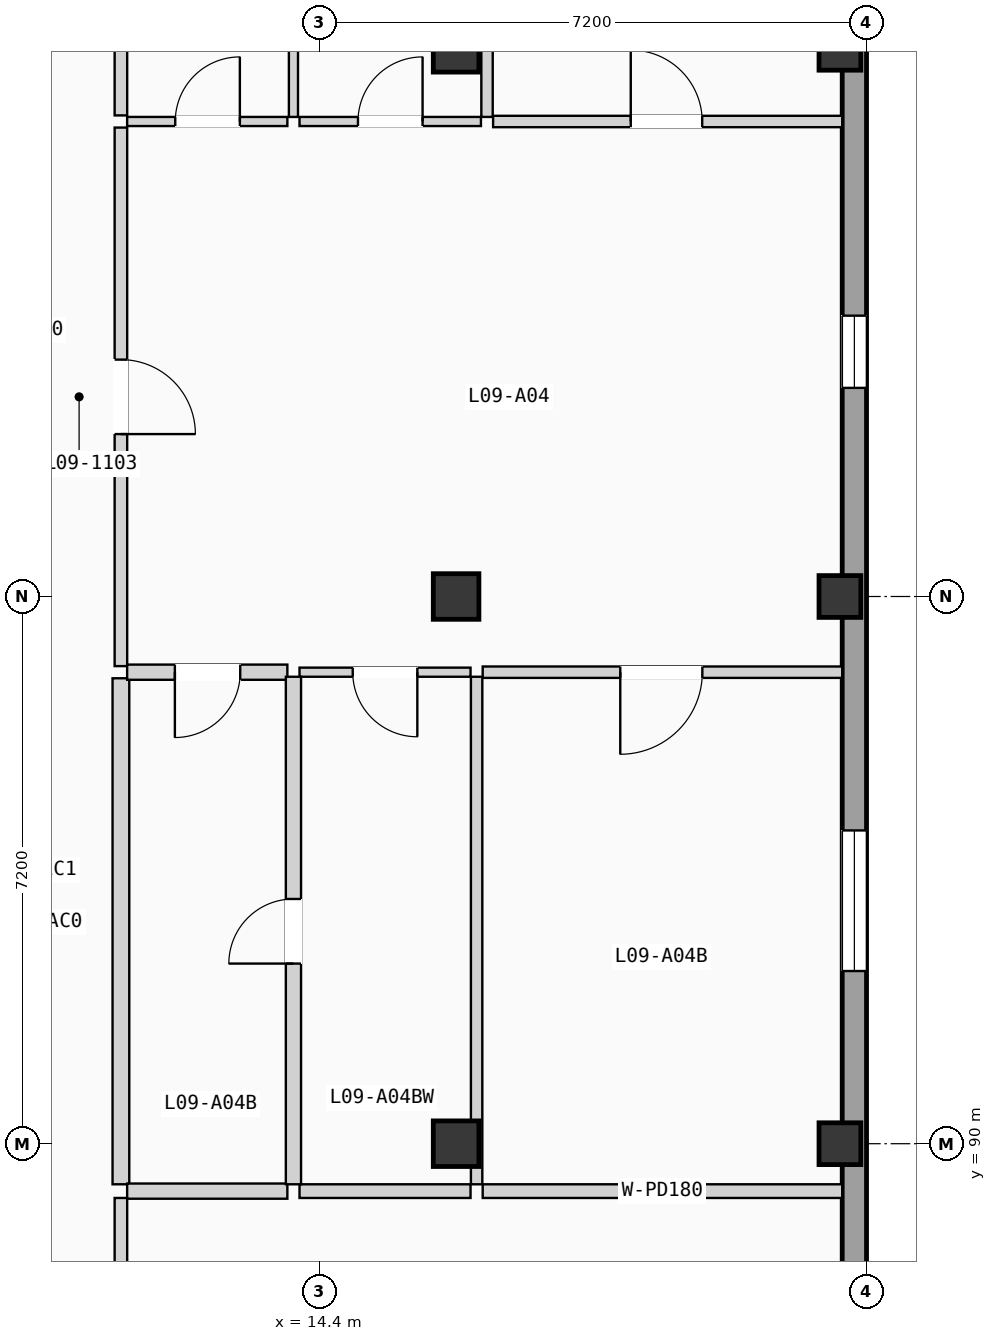
"""IFC4 building model, lengths in metres.
Left out: names, types, materials, properties, quantities, classifications, styles, units other than length and angle.
Written with IfcOpenShell. Run it as: python <this file> out.ifc"""

import sys

from ifc_helpers import new_model, si_unit, direction, frame, frame_2d, origin, origin_2d, place, context, subcontext, project, spatial, rectangle, extrude, element, fill, save


model = new_model("IFC4")
c1 = context("Model", 3, precision=1e-05, world=origin(), true_north=direction((0.0, 1.0)))
c2 = subcontext(c1, "Body", "Model", "MODEL_VIEW")
j1 = project(units=[si_unit("LENGTHUNIT", "METRE"), si_unit("PLANEANGLEUNIT", "RADIAN")], contexts=[c1])
p1 = place(None, origin())
s1 = spatial("IfcSite", under=j1, at=p1, CompositionType="ELEMENT")
p2 = place(p1, origin())
s2 = spatial("IfcBuilding", under=s1, at=p2, CompositionType="ELEMENT")
p3 = place(p2, frame((0.0, 0.0, 30.975)))
s3 = spatial("IfcBuildingStorey", under=s2, at=p3, CompositionType="ELEMENT", Elevation=30.975)
for number, where, z_axis, x_axis in (
    (1, (16.2, 90.0, 0.0), (0.0, 0.0, 1.0), (1.0, 0.0, 0.0)),
    (2, (16.2, 97.2, 0.0), (0.0, 0.0, 1.0), (1.0, 0.0, 0.0)),
    (3, (16.2, 104.4, 0.0), (0.0, 0.0, 1.0), (1.0, 0.0, 0.0)),
):
    element("IfcColumn", number, at=place(p3, frame(where, z_axis=z_axis, x_axis=x_axis)), inside=s3, PredefinedType="COLUMN", context=c2, shape_type="SweptSolid", body=[
        extrude(rectangle(XDim=0.6, YDim=0.6, at=origin_2d()), origin(), (0.0, 0.0, 1.0), 3.15),
    ])
for number, where, z_axis, x_axis in (
    (4, (21.25, 90.0, 0.0), (0.0, 0.0, 1.0), (1.0, 0.0, 0.0)),
    (5, (21.25, 97.2, 0.0), (0.0, 0.0, 1.0), (1.0, 0.0, 0.0)),
    (6, (21.25, 104.4, 0.0), (0.0, 0.0, 1.0), (1.0, 0.0, 0.0)),
):
    element("IfcColumn", number, at=place(p3, frame(where, z_axis=z_axis, x_axis=x_axis)), inside=s3, PredefinedType="COLUMN", context=c2, shape_type="SweptSolid", body=[
        extrude(rectangle(XDim=0.55, YDim=0.55, at=origin_2d()), origin(), (0.0, 0.0, 1.0), 3.15),
    ])
p4 = place(p3, frame((21.44, 68.72, 0.0), z_axis=(0.0, 0.0, 1.0), x_axis=(0.0, 1.0, 0.0)))
e7 = element("IfcWall", 7, at=p4, inside=s3, PredefinedType="SOLIDWALL", context=c2, shape_type="SweptSolid", body=[
    extrude(rectangle(XDim=49.76, YDim=0.32, at=frame_2d((24.88, 0.0))), origin(), (0.0, 0.0, 1.0), 2.9),
])
p5 = place(p4, frame((9.685, 0.0, 0.715)))
e8 = element("IfcOpeningElement", 8, at=p5, cuts=e7, PredefinedType="OPENING", context=c2, shape_type="SweptSolid", body=[
    extrude(rectangle(XDim=1.72, YDim=1.5, at=frame_2d((0.86, 0.75))), frame((0.0, 0.17, 0.0), z_axis=(0.0, -1.0, 0.0), x_axis=(1.0, 0.0, 0.0)), (0.0, 0.0, 1.0), 0.34),
])
p6 = place(p4, frame((16.598, 0.0, 0.565)))
e9 = element("IfcOpeningElement", 9, at=p6, cuts=e7, PredefinedType="OPENING", context=c2, shape_type="SweptSolid", body=[
    extrude(rectangle(XDim=1.72, YDim=1.65, at=frame_2d((0.86, 0.825))), frame((0.0, 0.17, 0.0), z_axis=(0.0, -1.0, 0.0), x_axis=(1.0, 0.0, 0.0)), (0.0, 0.0, 1.0), 0.34),
])
p7 = place(p4, frame((31.225, 0.0, 0.85)))
e10 = element("IfcOpeningElement", 10, at=p7, cuts=e7, PredefinedType="OPENING", context=c2, shape_type="SweptSolid", body=[
    extrude(rectangle(XDim=0.95, YDim=1.2, at=frame_2d((0.475, 0.6))), frame((0.0, 0.17, 0.0), z_axis=(0.0, -1.0, 0.0), x_axis=(1.0, 0.0, 0.0)), (0.0, 0.0, 1.0), 0.34),
])
p8 = place(p4, frame((23.552, 0.0, 0.9)))
e11 = element("IfcOpeningElement", 11, at=p8, cuts=e7, PredefinedType="OPENING", context=c2, shape_type="SweptSolid", body=[
    extrude(rectangle(XDim=1.85, YDim=1.2, at=frame_2d((0.925, 0.6))), frame((0.0, 0.17, 0.0), z_axis=(0.0, -1.0, 0.0), x_axis=(1.0, 0.0, 0.0)), (0.0, 0.0, 1.0), 0.34),
])
p9 = place(p4, frame((38.29, 0.0, 0.865)))
e12 = element("IfcOpeningElement", 12, at=p9, cuts=e7, PredefinedType="OPENING", context=c2, shape_type="SweptSolid", body=[
    extrude(rectangle(XDim=1.85, YDim=1.35, at=frame_2d((0.925, 0.675))), frame((0.0, 0.17, 0.0), z_axis=(0.0, -1.0, 0.0), x_axis=(1.0, 0.0, 0.0)), (0.0, 0.0, 1.0), 0.34),
])
p10 = place(p3, frame((11.79, 82.733, 0.0), z_axis=(0.0, 0.0, 1.0), x_axis=(0.0, 1.0, 0.0)))
e13 = element("IfcWall", 13, at=p10, inside=s3, PredefinedType="PARTITIONING", context=c2, shape_type="SweptSolid", body=[
    extrude(rectangle(XDim=6.553, YDim=0.165, at=frame_2d((3.276, 0.0))), origin(), (0.0, 0.0, 1.0), 2.87),
])
p11 = place(p10, frame((2.786, 0.0, 0.0)))
e14 = element("IfcOpeningElement", 14, at=p11, cuts=e13, PredefinedType="OPENING", context=c2, shape_type="SweptSolid", body=[
    extrude(rectangle(XDim=0.98, YDim=2.08, at=frame_2d((0.49, 1.04))), frame((0.0, 0.093, 0.0), z_axis=(0.0, -1.0, 0.0), x_axis=(1.0, 0.0, 0.0)), (0.0, 0.0, 1.0), 0.185),
])
p12 = place(p3, frame((11.79, 96.284, 0.0), z_axis=(0.0, 0.0, 1.0), x_axis=(0.0, 1.0, 0.0)))
e15 = element("IfcWall", 15, at=p12, inside=s3, PredefinedType="PARTITIONING", context=c2, shape_type="SweptSolid", body=[
    extrude(rectangle(XDim=7.086, YDim=0.165, at=frame_2d((3.543, 0.0))), origin(), (0.0, 0.0, 1.0), 2.87),
])
p13 = place(p12, frame((3.053, 0.0, 0.0)))
e16 = element("IfcOpeningElement", 16, at=p13, cuts=e15, PredefinedType="OPENING", context=c2, shape_type="SweptSolid", body=[
    extrude(rectangle(XDim=0.98, YDim=2.08, at=frame_2d((0.49, 1.04))), frame((0.0, 0.093, 0.0), z_axis=(0.0, -1.0, 0.0), x_axis=(1.0, 0.0, 0.0)), (0.0, 0.0, 1.0), 0.185),
])
p14 = place(p3, frame((11.79, 89.466, 0.0), z_axis=(0.0, 0.0, 1.0), x_axis=(0.0, 1.0, 0.0)))
e17 = element("IfcWall", 17, at=p14, inside=s3, PredefinedType="PLUMBINGWALL", context=c2, shape_type="SweptSolid", body=[
    extrude(rectangle(XDim=6.658, YDim=0.22, at=frame_2d((3.329, 0.0))), origin(), (0.0, 0.0, 1.0), 2.87),
])
p15 = place(p3, frame((11.79, 103.53, 0.0), z_axis=(0.0, 0.0, 1.0), x_axis=(0.0, 1.0, 0.0)))
e18 = element("IfcWall", 18, at=p15, inside=s3, PredefinedType="PARTITIONING", context=c2, shape_type="SweptSolid", body=[
    extrude(rectangle(XDim=7.67, YDim=0.165, at=frame_2d((3.835, 0.0))), origin(), (0.0, 0.0, 1.0), 2.87),
])
p16 = place(p3, frame((11.872, 89.376, 0.0), z_axis=(0.0, 0.0, 1.0), x_axis=(1.0, 0.0, 0.0)))
e19 = element("IfcWall", 19, at=p16, inside=s3, PredefinedType="PLUMBINGWALL", context=c2, shape_type="SweptSolid", body=[
    extrude(rectangle(XDim=2.108, YDim=0.2, at=frame_2d((1.054, 0.0))), origin(), (0.0, 0.0, 1.0), 2.87),
])
p17 = place(p3, frame((16.55, 89.376, 0.0), z_axis=(0.0, 0.0, 1.0), x_axis=(1.0, 0.0, 0.0)))
e20 = element("IfcWall", 20, at=p17, inside=s3, PredefinedType="PARTITIONING", context=c2, shape_type="SweptSolid", body=[
    extrude(rectangle(XDim=4.73, YDim=0.18, at=frame_2d((2.365, 0.0))), origin(), (0.0, 0.0, 1.0), 2.87),
])
p18 = place(p3, frame((14.14, 89.376, 0.0), z_axis=(0.0, 0.0, 1.0), x_axis=(1.0, 0.0, 0.0)))
e21 = element("IfcWall", 21, at=p18, inside=s3, PredefinedType="PARTITIONING", context=c2, shape_type="SweptSolid", body=[
    extrude(rectangle(XDim=2.25, YDim=0.18, at=frame_2d((1.125, 0.0))), origin(), (0.0, 0.0, 1.0), 2.87),
])
p19 = place(p3, frame((11.872, 96.204, 0.0), z_axis=(0.0, 0.0, 1.0), x_axis=(1.0, 0.0, 0.0)))
e22 = element("IfcWall", 22, at=p19, inside=s3, PredefinedType="PLUMBINGWALL", context=c2, shape_type="SweptSolid", body=[
    extrude(rectangle(XDim=2.108, YDim=0.2, at=frame_2d((1.054, 0.0))), origin(), (0.0, 0.0, 1.0), 2.87),
])
p20 = place(p19, frame((0.628, 0.0, 0.0)))
e23 = element("IfcOpeningElement", 23, at=p20, cuts=e22, PredefinedType="OPENING", context=c2, shape_type="SweptSolid", body=[
    extrude(rectangle(XDim=0.86, YDim=2.0, at=frame_2d((0.43, 1.0))), frame((0.0, 0.11, 0.0), z_axis=(0.0, -1.0, 0.0), x_axis=(1.0, 0.0, 0.0)), (0.0, 0.0, 1.0), 0.22),
])
p21 = place(p3, frame((11.872, 103.45, 0.0), z_axis=(0.0, 0.0, 1.0), x_axis=(1.0, 0.0, 0.0)))
e24 = element("IfcWall", 24, at=p21, inside=s3, PredefinedType="PARTITIONING", context=c2, shape_type="SweptSolid", body=[
    extrude(rectangle(XDim=2.108, YDim=0.12, at=frame_2d((1.054, 0.0))), origin(), (0.0, 0.0, 1.0), 2.87),
])
p22 = place(p21, frame((0.633, 0.0, 0.0)))
e25 = element("IfcOpeningElement", 25, at=p22, cuts=e24, PredefinedType="OPENING", context=c2, shape_type="SweptSolid", body=[
    extrude(rectangle(XDim=0.85, YDim=2.01, at=frame_2d((0.425, 1.005))), frame((0.0, 0.07, 0.0), z_axis=(0.0, -1.0, 0.0), x_axis=(1.0, 0.0, 0.0)), (0.0, 0.0, 1.0), 0.14),
])
p23 = place(p3, frame((16.55, 96.204, 0.0), z_axis=(0.0, 0.0, 1.0), x_axis=(1.0, 0.0, 0.0)))
e26 = element("IfcWall", 26, at=p23, inside=s3, PredefinedType="PARTITIONING", context=c2, shape_type="SweptSolid", body=[
    extrude(rectangle(XDim=4.73, YDim=0.15, at=frame_2d((2.365, 0.0))), origin(), (0.0, 0.0, 1.0), 2.87),
])
p24 = place(p23, frame((1.81, 0.0, 0.0)))
e27 = element("IfcOpeningElement", 27, at=p24, cuts=e26, PredefinedType="OPENING", context=c2, shape_type="SweptSolid", body=[
    extrude(rectangle(XDim=1.08, YDim=2.1, at=frame_2d((0.54, 1.05))), frame((0.0, 0.085, 0.0), z_axis=(0.0, -1.0, 0.0), x_axis=(1.0, 0.0, 0.0)), (0.0, 0.0, 1.0), 0.17),
])
p25 = place(p3, frame((14.14, 96.204, 0.0), z_axis=(0.0, 0.0, 1.0), x_axis=(1.0, 0.0, 0.0)))
e28 = element("IfcWall", 28, at=p25, inside=s3, PredefinedType="PARTITIONING", context=c2, shape_type="SweptSolid", body=[
    extrude(rectangle(XDim=2.25, YDim=0.12, at=frame_2d((1.125, 0.0))), origin(), (0.0, 0.0, 1.0), 2.87),
])
p26 = place(p25, frame((0.7, 0.0, 0.0)))
e29 = element("IfcOpeningElement", 29, at=p26, cuts=e28, PredefinedType="OPENING", context=c2, shape_type="SweptSolid", body=[
    extrude(rectangle(XDim=0.85, YDim=2.01, at=frame_2d((0.425, 1.005))), frame((0.0, 0.07, 0.0), z_axis=(0.0, -1.0, 0.0), x_axis=(1.0, 0.0, 0.0)), (0.0, 0.0, 1.0), 0.14),
])
p27 = place(p3, frame((16.687, 103.45, 0.0), z_axis=(0.0, 0.0, 1.0), x_axis=(1.0, 0.0, 0.0)))
e30 = element("IfcWall", 30, at=p27, inside=s3, PredefinedType="PARTITIONING", context=c2, shape_type="SweptSolid", body=[
    extrude(rectangle(XDim=4.593, YDim=0.15, at=frame_2d((2.296, 0.0))), origin(), (0.0, 0.0, 1.0), 2.87),
])
p28 = place(p27, frame((1.811, 0.0, 0.0)))
e31 = element("IfcOpeningElement", 31, at=p28, cuts=e30, PredefinedType="OPENING", context=c2, shape_type="SweptSolid", body=[
    extrude(rectangle(XDim=0.94, YDim=2.06, at=frame_2d((0.47, 1.03))), frame((0.0, 0.085, 0.0), z_axis=(0.0, -1.0, 0.0), x_axis=(1.0, 0.0, 0.0)), (0.0, 0.0, 1.0), 0.17),
])
p29 = place(p3, frame((14.14, 103.45, 0.0), z_axis=(0.0, 0.0, 1.0), x_axis=(1.0, 0.0, 0.0)))
e32 = element("IfcWall", 32, at=p29, inside=s3, PredefinedType="PARTITIONING", context=c2, shape_type="SweptSolid", body=[
    extrude(rectangle(XDim=2.387, YDim=0.12, at=frame_2d((1.194, 0.0))), origin(), (0.0, 0.0, 1.0), 2.87),
])
p30 = place(p29, frame((0.769, 0.0, 0.0)))
e33 = element("IfcOpeningElement", 33, at=p30, cuts=e32, PredefinedType="OPENING", context=c2, shape_type="SweptSolid", body=[
    extrude(rectangle(XDim=0.85, YDim=2.01, at=frame_2d((0.425, 1.005))), frame((0.0, 0.07, 0.0), z_axis=(0.0, -1.0, 0.0), x_axis=(1.0, 0.0, 0.0)), (0.0, 0.0, 1.0), 0.14),
])
p31 = place(p3, frame((14.06, 89.466, 0.0), z_axis=(0.0, 0.0, 1.0), x_axis=(0.0, 1.0, 0.0)))
e34 = element("IfcWall", 34, at=p31, inside=s3, PredefinedType="PLUMBINGWALL", context=c2, shape_type="SweptSolid", body=[
    extrude(rectangle(XDim=6.678, YDim=0.2, at=frame_2d((3.339, 0.0))), origin(), (0.0, 0.0, 1.0), 2.87),
])
p32 = place(p31, frame((2.904, 0.0, 0.0)))
e35 = element("IfcOpeningElement", 35, at=p32, cuts=e34, PredefinedType="OPENING", context=c2, shape_type="SweptSolid", body=[
    extrude(rectangle(XDim=0.85, YDim=2.01, at=frame_2d((0.425, 1.005))), frame((0.0, 0.11, 0.0), z_axis=(0.0, -1.0, 0.0), x_axis=(1.0, 0.0, 0.0)), (0.0, 0.0, 1.0), 0.22),
])
p33 = place(p3, frame((14.06, 103.51, 0.0), z_axis=(0.0, 0.0, 1.0), x_axis=(0.0, 1.0, 0.0)))
e36 = element("IfcWall", 36, at=p33, inside=s3, PredefinedType="PARTITIONING", context=c2, shape_type="SweptSolid", body=[
    extrude(rectangle(XDim=7.69, YDim=0.12, at=frame_2d((3.845, 0.0))), origin(), (0.0, 0.0, 1.0), 2.87),
])
p34 = place(p3, frame((16.47, 89.466, 0.0), z_axis=(0.0, 0.0, 1.0), x_axis=(0.0, 1.0, 0.0)))
e37 = element("IfcWall", 37, at=p34, inside=s3, PredefinedType="PARTITIONING", context=c2, shape_type="SweptSolid", body=[
    extrude(rectangle(XDim=6.678, YDim=0.15, at=frame_2d((3.339, 0.0))), origin(), (0.0, 0.0, 1.0), 2.87),
])
p35 = place(p3, frame((16.607, 103.51, 0.0), z_axis=(0.0, 0.0, 1.0), x_axis=(0.0, 1.0, 0.0)))
e38 = element("IfcWall", 38, at=p35, inside=s3, PredefinedType="PARTITIONING", context=c2, shape_type="SweptSolid", body=[
    extrude(rectangle(XDim=7.69, YDim=0.15, at=frame_2d((3.845, 0.0))), origin(), (0.0, 0.0, 1.0), 2.87),
])
p36 = place(p7, origin())
e39 = element("IfcWindow", 39, at=p36, inside=s3, PartitioningType="SINGLE_PANEL", PredefinedType="WINDOW", context=c2, shape_type="SweptSolid", body=[
    extrude(rectangle(XDim=0.95, YDim=1.2, at=frame_2d((0.475, 0.6))), frame((0.0, 0.03, 0.0), z_axis=(0.0, -1.0, 0.0), x_axis=(1.0, 0.0, 0.0)), (0.0, 0.0, 1.0), 0.06),
])
fill(e10, e39)
p37 = place(p8, origin())
e40 = element("IfcWindow", 40, at=p37, inside=s3, PartitioningType="DOUBLE_PANEL_VERTICAL", PredefinedType="WINDOW", context=c2, shape_type="SweptSolid", body=[
    extrude(rectangle(XDim=1.85, YDim=1.2, at=frame_2d((0.925, 0.6))), frame((0.0, 0.03, 0.0), z_axis=(0.0, -1.0, 0.0), x_axis=(1.0, 0.0, 0.0)), (0.0, 0.0, 1.0), 0.06),
])
fill(e11, e40)
p38 = place(p13, frame((0.98, 0.0, 0.0), z_axis=(0.0, 0.0, 1.0), x_axis=(-1.0, 0.0, 0.0)))
e41 = element("IfcDoor", 41, at=p38, inside=s3, OperationType="SINGLE_SWING_LEFT", PredefinedType="DOOR", context=c2, shape_type="SweptSolid", body=[
    extrude(rectangle(XDim=0.98, YDim=2.08, at=frame_2d((0.49, 1.04))), frame((0.0, 0.025, 0.0), z_axis=(0.0, -1.0, 0.0), x_axis=(1.0, 0.0, 0.0)), (0.0, 0.0, 1.0), 0.05),
])
fill(e16, e41)
p39 = place(p20, frame((0.86, 0.0, 0.0), z_axis=(0.0, 0.0, 1.0), x_axis=(-1.0, 0.0, 0.0)))
e42 = element("IfcDoor", 42, at=p39, inside=s3, OperationType="SINGLE_SWING_LEFT", PredefinedType="DOOR", context=c2, shape_type="SweptSolid", body=[
    extrude(rectangle(XDim=0.86, YDim=2.0, at=frame_2d((0.43, 1.0))), frame((0.0, 0.025, 0.0), z_axis=(0.0, -1.0, 0.0), x_axis=(1.0, 0.0, 0.0)), (0.0, 0.0, 1.0), 0.05),
])
fill(e23, e42)
p40 = place(p22, origin())
e43 = element("IfcDoor", 43, at=p40, inside=s3, OperationType="SINGLE_SWING_RIGHT", PredefinedType="DOOR", context=c2, shape_type="SweptSolid", body=[
    extrude(rectangle(XDim=0.85, YDim=2.01, at=frame_2d((0.425, 1.005))), frame((0.0, 0.025, 0.0), z_axis=(0.0, -1.0, 0.0), x_axis=(1.0, 0.0, 0.0)), (0.0, 0.0, 1.0), 0.05),
])
fill(e25, e43)
p41 = place(p24, frame((1.08, 0.0, 0.0), z_axis=(0.0, 0.0, 1.0), x_axis=(-1.0, 0.0, 0.0)))
e44 = element("IfcDoor", 44, at=p41, inside=s3, OperationType="SINGLE_SWING_LEFT", PredefinedType="DOOR", context=c2, shape_type="SweptSolid", body=[
    extrude(rectangle(XDim=1.08, YDim=2.1, at=frame_2d((0.54, 1.05))), frame((0.0, 0.025, 0.0), z_axis=(0.0, -1.0, 0.0), x_axis=(1.0, 0.0, 0.0)), (0.0, 0.0, 1.0), 0.05),
])
fill(e27, e44)
p42 = place(p26, frame((0.85, 0.0, 0.0), z_axis=(0.0, 0.0, 1.0), x_axis=(-1.0, 0.0, 0.0)))
e45 = element("IfcDoor", 45, at=p42, inside=s3, OperationType="SINGLE_SWING_RIGHT", PredefinedType="DOOR", context=c2, shape_type="SweptSolid", body=[
    extrude(rectangle(XDim=0.85, YDim=2.01, at=frame_2d((0.425, 1.005))), frame((0.0, 0.025, 0.0), z_axis=(0.0, -1.0, 0.0), x_axis=(1.0, 0.0, 0.0)), (0.0, 0.0, 1.0), 0.05),
])
fill(e29, e45)
p43 = place(p28, origin())
e46 = element("IfcDoor", 46, at=p43, inside=s3, OperationType="SINGLE_SWING_LEFT", PredefinedType="DOOR", context=c2, shape_type="SweptSolid", body=[
    extrude(rectangle(XDim=0.94, YDim=2.06, at=frame_2d((0.47, 1.03))), frame((0.0, 0.025, 0.0), z_axis=(0.0, -1.0, 0.0), x_axis=(1.0, 0.0, 0.0)), (0.0, 0.0, 1.0), 0.05),
])
fill(e31, e46)
p44 = place(p30, origin())
e47 = element("IfcDoor", 47, at=p44, inside=s3, OperationType="SINGLE_SWING_RIGHT", PredefinedType="DOOR", context=c2, shape_type="SweptSolid", body=[
    extrude(rectangle(XDim=0.85, YDim=2.01, at=frame_2d((0.425, 1.005))), frame((0.0, 0.025, 0.0), z_axis=(0.0, -1.0, 0.0), x_axis=(1.0, 0.0, 0.0)), (0.0, 0.0, 1.0), 0.05),
])
fill(e33, e47)
p45 = place(p32, origin())
e48 = element("IfcDoor", 48, at=p45, inside=s3, OperationType="SINGLE_SWING_LEFT", PredefinedType="DOOR", context=c2, shape_type="SweptSolid", body=[
    extrude(rectangle(XDim=0.85, YDim=2.01, at=frame_2d((0.425, 1.005))), frame((0.0, 0.025, 0.0), z_axis=(0.0, -1.0, 0.0), x_axis=(1.0, 0.0, 0.0)), (0.0, 0.0, 1.0), 0.05),
])
fill(e35, e48)
save(model, sys.argv[1])
